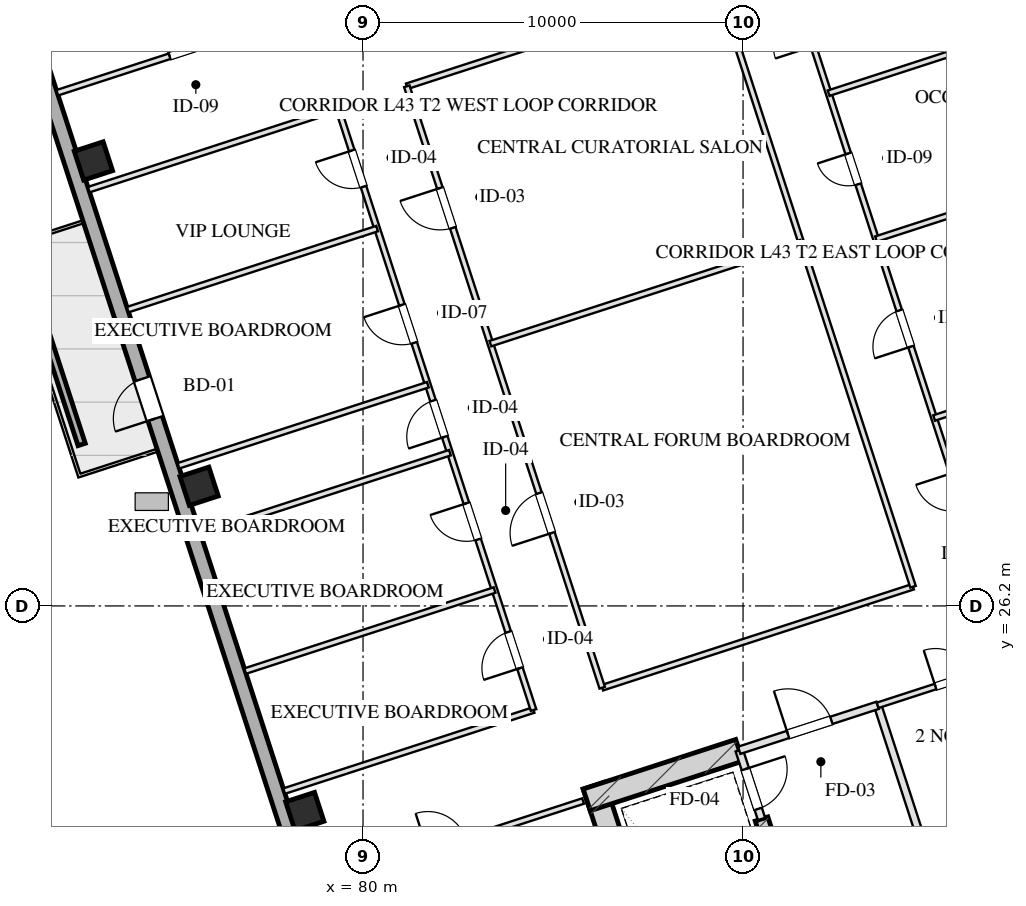
"""IFC4 building model, lengths in metres.
Left out: names, types, materials, properties, quantities, classifications, styles, units other than length and angle.
Written with IfcOpenShell. Run it as: python <this file> out.ifc"""

import sys

from ifc_helpers import new_model, si_unit, direction, frame, frame_2d, origin, origin_2d, place, context, subcontext, project, spatial, rectangle, hollow_rectangle, extrude, element, fill, save


model = new_model("IFC4")
c1 = context("Model", 3, precision=1e-05, world=origin(), true_north=direction((0.0, 1.0)))
c2 = subcontext(c1, "Body", "Model", "MODEL_VIEW")
j1 = project(units=[si_unit("LENGTHUNIT", "METRE"), si_unit("PLANEANGLEUNIT", "RADIAN")], contexts=[c1])
p1 = place(None, origin())
s1 = spatial("IfcSite", under=j1, at=p1, CompositionType="ELEMENT")
p2 = place(p1, origin())
s2 = spatial("IfcBuilding", under=s1, at=p2, CompositionType="ELEMENT")
p3 = place(p2, frame((0.0, 0.0, 163.3)))
s3 = spatial("IfcBuildingStorey", under=s2, at=p3, CompositionType="ELEMENT", Elevation=163.3)
p4 = place(p3, frame((86.078, 21.475, 0.0), z_axis=(0.0, 0.0, 1.0), x_axis=(0.309017938678, -0.951056209472, 0.0)))
e1 = element("IfcWall", 1, at=p4, inside=s3, PredefinedType="SHEAR", context=c2, shape_type="SweptSolid", body=[
    extrude(rectangle(XDim=9.48, YDim=0.6, at=frame_2d((4.74, 0.0))), origin(), (0.0, 0.0, 1.0), 3.45),
])
p5 = place(p3, frame((90.486, 20.594, 0.0), z_axis=(0.0, 0.0, 1.0), x_axis=(0.309020428229, -0.951055400562, 0.0)))
e2 = element("IfcWall", 2, at=p5, inside=s3, PredefinedType="SHEAR", context=c2, shape_type="SweptSolid", body=[
    extrude(rectangle(XDim=6.98, YDim=0.35, at=frame_2d((3.49, 0.0))), origin(), (0.0, 0.0, 1.0), 3.45),
])
p6 = place(p3, frame((85.886, 21.097, 0.0), z_axis=(0.0, 0.0, 1.0), x_axis=(0.951068073652, 0.308981422225, 0.0)))
e3 = element("IfcWall", 3, at=p6, inside=s3, PredefinedType="SHEAR", context=c2, shape_type="SweptSolid", body=[
    extrude(rectangle(XDim=4.22, YDim=0.6, at=frame_2d((2.11, 0.0))), origin(), (0.0, 0.0, 1.0), 3.45),
])
for number, where, z_axis, x_axis in (
    (4, (78.468, 20.79, 0.0), (0.0, 0.0, 1.0), (0.951, 0.309, 0.0)),
    (5, (75.687, 29.349, 0.0), (0.0, 0.0, 1.0), (0.951, 0.309, 0.0)),
    (6, (72.906, 37.909, 0.0), (0.0, 0.0, 1.0), (0.951, 0.309, 0.0)),
):
    element("IfcColumn", number, at=place(p3, frame(where, z_axis=z_axis, x_axis=x_axis)), inside=s3, PredefinedType="COLUMN", context=c2, shape_type="SweptSolid", body=[
        extrude(hollow_rectangle(XDim=0.8, YDim=0.8, WallThickness=0.028, at=origin_2d()), origin(), (0.0, 0.0, 1.0), 3.451),
    ])
p7 = place(p3, frame((81.776, 8.827, 0.0), z_axis=(0.0, 0.0, 1.0), x_axis=(-0.309014228706, 0.951057414911, 0.0)))
e7 = element("IfcWall", 7, at=p7, inside=s3, PredefinedType="SOLIDWALL", context=c2, shape_type="SweptSolid", body=[
    extrude(rectangle(XDim=42.8, YDim=0.4, at=frame_2d((21.4, 0.0))), origin(), (0.0, 0.0, 1.0), 2.61),
])
p8 = place(p7, frame((23.45, 0.0, 0.0)))
e8 = element("IfcOpeningElement", 8, at=p8, cuts=e7, PredefinedType="OPENING", context=c2, shape_type="SweptSolid", body=[
    extrude(rectangle(XDim=1.1, YDim=2.15, at=frame_2d((0.55, 1.075))), frame((0.0, 0.21, 0.0), z_axis=(0.0, -1.0, 0.0), x_axis=(1.0, 0.0, 0.0)), (0.0, 0.0, 1.0), 0.42),
])
p9 = place(p3, frame((72.596, 30.448, 0.0), z_axis=(0.0, 0.0, 1.0), x_axis=(-0.30900096172, 0.951061725471, 0.0)))
e9 = element("IfcWall", 9, at=p9, inside=s3, PredefinedType="PARAPET", context=c2, shape_type="SweptSolid", body=[
    extrude(rectangle(XDim=4.8, YDim=0.2, at=frame_2d((2.4, 0.0))), origin(), (0.0, 0.0, 1.0), 0.75),
])
p10 = place(p3, frame((89.899, 22.401, 0.0), z_axis=(0.0, 0.0, 1.0), x_axis=(0.308932062672, -0.951084108086, 0.0)))
e10 = element("IfcWall", 10, at=p10, inside=s3, PredefinedType="PARTITIONING", context=c2, shape_type="SweptSolid", body=[
    extrude(rectangle(XDim=1.9, YDim=0.2, at=frame_2d((0.95, 0.0))), origin(), (0.0, 0.0, 1.0), 3.175),
])
p11 = place(p10, frame((0.52, 0.0, 0.0)))
e11 = element("IfcOpeningElement", 11, at=p11, cuts=e10, PredefinedType="OPENING", context=c2, shape_type="SweptSolid", body=[
    extrude(rectangle(XDim=1.1, YDim=2.05, at=frame_2d((0.55, 1.025))), frame((0.0, 0.11, 0.0), z_axis=(0.0, -1.0, 0.0), x_axis=(1.0, 0.0, 0.0)), (0.0, 0.0, 1.0), 0.22),
])
p12 = place(p3, frame((93.542, 23.585, 0.0), z_axis=(0.0, 0.0, 1.0), x_axis=(0.309042196757, -0.951048327176, 0.0)))
e12 = element("IfcWall", 12, at=p12, inside=s3, PredefinedType="PARTITIONING", context=c2, shape_type="SweptSolid", body=[
    extrude(rectangle(XDim=8.43, YDim=0.2, at=frame_2d((4.215, 0.0))), origin(), (0.0, 0.0, 1.0), 3.175),
])
p13 = place(p3, frame((89.899, 22.401, 0.0), z_axis=(0.0, 0.0, 1.0), x_axis=(0.951046716504, 0.309047153403, 0.0)))
e13 = element("IfcWall", 13, at=p13, inside=s3, PredefinedType="PARTITIONING", context=c2, shape_type="SweptSolid", body=[
    extrude(rectangle(XDim=3.83, YDim=0.2, at=frame_2d((1.915, 0.0))), origin(), (0.0, 0.0, 1.0), 3.175),
])
p14 = place(p13, frame((1.35, 0.0, 0.0)))
e14 = element("IfcOpeningElement", 14, at=p14, cuts=e13, PredefinedType="OPENING", context=c2, shape_type="SweptSolid", body=[
    extrude(rectangle(XDim=1.2, YDim=2.05, at=frame_2d((0.6, 1.025))), frame((0.0, 0.11, 0.0), z_axis=(0.0, -1.0, 0.0), x_axis=(1.0, 0.0, 0.0)), (0.0, 0.0, 1.0), 0.22),
])
p15 = place(p3, frame((93.542, 23.585, 0.0), z_axis=(0.0, 0.0, 1.0), x_axis=(0.951063829732, 0.308994485023, 0.0)))
e15 = element("IfcWall", 15, at=p15, inside=s3, PredefinedType="PARTITIONING", context=c2, shape_type="SweptSolid", body=[
    extrude(rectangle(XDim=4.4, YDim=0.15, at=frame_2d((2.2, 0.0))), origin(), (0.0, 0.0, 1.0), 3.175),
])
p16 = place(p15, frame((1.6, 0.0, 0.0)))
e16 = element("IfcOpeningElement", 16, at=p16, cuts=e15, PredefinedType="OPENING", context=c2, shape_type="SweptSolid", body=[
    extrude(rectangle(XDim=1.0, YDim=2.05, at=frame_2d((0.5, 1.025))), frame((0.0, 0.085, 0.0), z_axis=(0.0, -1.0, 0.0), x_axis=(1.0, 0.0, 0.0)), (0.0, 0.0, 1.0), 0.17),
])
p17 = place(p3, frame((78.753, 18.78, 0.0), z_axis=(0.0, 0.0, 1.0), x_axis=(0.951060977215, 0.309003264738, 0.0)))
e17 = element("IfcWall", 17, at=p17, inside=s3, PredefinedType="PARTITIONING", context=c2, shape_type="SweptSolid", body=[
    extrude(rectangle(XDim=7.4, YDim=0.15, at=frame_2d((3.7, 0.0))), origin(), (0.0, 0.0, 1.0), 3.175),
])
p18 = place(p17, frame((3.108, 0.0, 0.0)))
e18 = element("IfcOpeningElement", 18, at=p18, cuts=e17, PredefinedType="OPENING", context=c2, shape_type="SweptSolid", body=[
    extrude(rectangle(XDim=1.05, YDim=2.05, at=frame_2d((0.525, 1.025))), frame((0.0, 0.085, 0.0), z_axis=(0.0, -1.0, 0.0), x_axis=(1.0, 0.0, 0.0)), (0.0, 0.0, 1.0), 0.17),
])
p19 = place(p3, frame((71.955, 39.703, 0.0), z_axis=(0.0, 0.0, 1.0), x_axis=(0.951060977215, 0.309003264738, 0.0)))
e19 = element("IfcWall", 19, at=p19, inside=s3, PredefinedType="PARTITIONING", context=c2, shape_type="SweptSolid", body=[
    extrude(rectangle(XDim=7.4, YDim=0.15, at=frame_2d((3.7, 0.0))), origin(), (0.0, 0.0, 1.0), 3.175),
])
p20 = place(p19, frame((3.108, 0.0, 0.0)))
e20 = element("IfcOpeningElement", 20, at=p20, cuts=e19, PredefinedType="OPENING", context=c2, shape_type="SweptSolid", body=[
    extrude(rectangle(XDim=0.85, YDim=2.05, at=frame_2d((0.425, 1.025))), frame((0.0, 0.085, 0.0), z_axis=(0.0, -1.0, 0.0), x_axis=(1.0, 0.0, 0.0)), (0.0, 0.0, 1.0), 0.17),
])
p21 = place(p3, frame((77.925, 21.328, 0.0), z_axis=(0.0, 0.0, 1.0), x_axis=(0.951061887302, 0.309000463626, 0.0)))
e21 = element("IfcWall", 21, at=p21, inside=s3, PredefinedType="PARTITIONING", context=c2, shape_type="SweptSolid", body=[
    extrude(rectangle(XDim=6.9, YDim=0.15, at=frame_2d((3.45, 0.0))), origin(), (0.0, 0.0, 1.0), 3.175),
])
p22 = place(p3, frame((86.294, 24.048, 0.0), z_axis=(0.0, 0.0, 1.0), x_axis=(0.951052008164, 0.309030868631, 0.0)))
e22 = element("IfcWall", 22, at=p22, inside=s3, PredefinedType="PARTITIONING", context=c2, shape_type="SweptSolid", body=[
    extrude(rectangle(XDim=8.6, YDim=0.15, at=frame_2d((4.3, 0.0))), origin(), (0.0, 0.0, 1.0), 3.175),
])
p23 = place(p3, frame((72.783, 37.154, 0.0), z_axis=(0.0, 0.0, 1.0), x_axis=(0.951051488548, 0.309032467762, 0.0)))
e23 = element("IfcWall", 23, at=p23, inside=s3, PredefinedType="PARTITIONING", context=c2, shape_type="SweptSolid", body=[
    extrude(rectangle(XDim=6.9, YDim=0.15, at=frame_2d((3.45, 0.0))), origin(), (0.0, 0.0, 1.0), 3.175),
])
p24 = place(p3, frame((81.152, 39.873, 0.0), z_axis=(0.0, 0.0, 1.0), x_axis=(0.951057640494, 0.309013534425, 0.0)))
e24 = element("IfcWall", 24, at=p24, inside=s3, PredefinedType="PARTITIONING", context=c2, shape_type="SweptSolid", body=[
    extrude(rectangle(XDim=8.6, YDim=0.15, at=frame_2d((4.3, 0.0))), origin(), (0.0, 0.0, 1.0), 3.175),
])
p25 = place(p3, frame((84.487, 23.46, 0.0), z_axis=(0.0, 0.0, 1.0), x_axis=(-0.30901773025, 0.951056277195, 0.0)))
e25 = element("IfcWall", 25, at=p25, inside=s3, PredefinedType="PARTITIONING", context=c2, shape_type="SweptSolid", body=[
    extrude(rectangle(XDim=16.64, YDim=0.15, at=frame_2d((8.32, 0.0))), origin(), (0.0, 0.0, 1.0), 3.175),
])
p26 = place(p25, frame((1.16, 0.0, 0.0)))
e26 = element("IfcOpeningElement", 26, at=p26, cuts=e25, PredefinedType="OPENING", context=c2, shape_type="SweptSolid", body=[
    extrude(rectangle(XDim=1.0, YDim=2.05, at=frame_2d((0.5, 1.025))), frame((0.0, 0.085, 0.0), z_axis=(0.0, -1.0, 0.0), x_axis=(1.0, 0.0, 0.0)), (0.0, 0.0, 1.0), 0.17),
])
p27 = place(p25, frame((4.72, 0.0, 0.0)))
e27 = element("IfcOpeningElement", 27, at=p27, cuts=e25, PredefinedType="OPENING", context=c2, shape_type="SweptSolid", body=[
    extrude(rectangle(XDim=1.0, YDim=2.05, at=frame_2d((0.5, 1.025))), frame((0.0, 0.085, 0.0), z_axis=(0.0, -1.0, 0.0), x_axis=(1.0, 0.0, 0.0)), (0.0, 0.0, 1.0), 0.17),
])
p28 = place(p25, frame((7.56, 0.0, 0.0)))
e28 = element("IfcOpeningElement", 28, at=p28, cuts=e25, PredefinedType="OPENING", context=c2, shape_type="SweptSolid", body=[
    extrude(rectangle(XDim=1.0, YDim=2.05, at=frame_2d((0.5, 1.025))), frame((0.0, 0.085, 0.0), z_axis=(0.0, -1.0, 0.0), x_axis=(1.0, 0.0, 0.0)), (0.0, 0.0, 1.0), 0.17),
])
p29 = place(p25, frame((10.16, 0.0, 0.0)))
e29 = element("IfcOpeningElement", 29, at=p29, cuts=e25, PredefinedType="OPENING", context=c2, shape_type="SweptSolid", body=[
    extrude(rectangle(XDim=1.05, YDim=2.05, at=frame_2d((0.525, 1.025))), frame((0.0, 0.085, 0.0), z_axis=(0.0, -1.0, 0.0), x_axis=(1.0, 0.0, 0.0)), (0.0, 0.0, 1.0), 0.17),
])
p30 = place(p25, frame((14.48, 0.0, 0.0)))
e30 = element("IfcOpeningElement", 30, at=p30, cuts=e25, PredefinedType="OPENING", context=c2, shape_type="SweptSolid", body=[
    extrude(rectangle(XDim=1.0, YDim=2.05, at=frame_2d((0.5, 1.025))), frame((0.0, 0.085, 0.0), z_axis=(0.0, -1.0, 0.0), x_axis=(1.0, 0.0, 0.0)), (0.0, 0.0, 1.0), 0.17),
])
p31 = place(p3, frame((86.294, 24.048, 0.0), z_axis=(0.0, 0.0, 1.0), x_axis=(-0.309004459387, 0.951060589068, 0.0)))
e31 = element("IfcWall", 31, at=p31, inside=s3, PredefinedType="PARTITIONING", context=c2, shape_type="SweptSolid", body=[
    extrude(rectangle(XDim=16.64, YDim=0.15, at=frame_2d((8.32, 0.0))), origin(), (0.0, 0.0, 1.0), 3.175),
])
p32 = place(p31, frame((4.284, 0.0, 0.0)))
e32 = element("IfcOpeningElement", 32, at=p32, cuts=e31, PredefinedType="OPENING", context=c2, shape_type="SweptSolid", body=[
    extrude(rectangle(XDim=1.1, YDim=2.05, at=frame_2d((0.55, 1.025))), frame((0.0, 0.085, 0.0), z_axis=(0.0, -1.0, 0.0), x_axis=(1.0, 0.0, 0.0)), (0.0, 0.0, 1.0), 0.17),
])
p33 = place(p31, frame((12.724, 0.0, 0.0)))
e33 = element("IfcOpeningElement", 33, at=p33, cuts=e31, PredefinedType="OPENING", context=c2, shape_type="SweptSolid", body=[
    extrude(rectangle(XDim=1.1, YDim=2.05, at=frame_2d((0.55, 1.025))), frame((0.0, 0.085, 0.0), z_axis=(0.0, -1.0, 0.0), x_axis=(1.0, 0.0, 0.0)), (0.0, 0.0, 1.0), 0.17),
])
p34 = place(p3, frame((94.473, 26.705, 0.0), z_axis=(0.0, 0.0, 1.0), x_axis=(-0.309022042254, 0.951054876125, 0.0)))
e34 = element("IfcWall", 34, at=p34, inside=s3, PredefinedType="PARTITIONING", context=c2, shape_type="SweptSolid", body=[
    extrude(rectangle(XDim=16.64, YDim=0.15, at=frame_2d((8.32, 0.0))), origin(), (0.0, 0.0, 1.0), 3.175),
])
p35 = place(p3, frame((96.28, 27.292, 0.0), z_axis=(0.0, 0.0, 1.0), x_axis=(-0.309008771245, 0.951059188113, 0.0)))
e35 = element("IfcWall", 35, at=p35, inside=s3, PredefinedType="PARTITIONING", context=c2, shape_type="SweptSolid", body=[
    extrude(rectangle(XDim=16.64, YDim=0.15, at=frame_2d((8.32, 0.0))), origin(), (0.0, 0.0, 1.0), 3.175),
])
p36 = place(p35, frame((1.526, 0.0, 0.0)))
e36 = element("IfcOpeningElement", 36, at=p36, cuts=e35, PredefinedType="OPENING", context=c2, shape_type="SweptSolid", body=[
    extrude(rectangle(XDim=1.0, YDim=2.05, at=frame_2d((0.5, 1.025))), frame((0.0, 0.085, 0.0), z_axis=(0.0, -1.0, 0.0), x_axis=(1.0, 0.0, 0.0)), (0.0, 0.0, 1.0), 0.17),
])
p37 = place(p35, frame((6.026, 0.0, 0.0)))
e37 = element("IfcOpeningElement", 37, at=p37, cuts=e35, PredefinedType="OPENING", context=c2, shape_type="SweptSolid", body=[
    extrude(rectangle(XDim=1.0, YDim=2.05, at=frame_2d((0.5, 1.025))), frame((0.0, 0.085, 0.0), z_axis=(0.0, -1.0, 0.0), x_axis=(1.0, 0.0, 0.0)), (0.0, 0.0, 1.0), 0.17),
])
p38 = place(p35, frame((10.519, 0.0, 0.0)))
e38 = element("IfcOpeningElement", 38, at=p38, cuts=e35, PredefinedType="OPENING", context=c2, shape_type="SweptSolid", body=[
    extrude(rectangle(XDim=0.85, YDim=2.05, at=frame_2d((0.425, 1.025))), frame((0.0, 0.085, 0.0), z_axis=(0.0, -1.0, 0.0), x_axis=(1.0, 0.0, 0.0)), (0.0, 0.0, 1.0), 0.17),
])
p39 = place(p35, frame((14.338, 0.0, 0.0)))
e39 = element("IfcOpeningElement", 39, at=p39, cuts=e35, PredefinedType="OPENING", context=c2, shape_type="SweptSolid", body=[
    extrude(rectangle(XDim=1.05, YDim=2.05, at=frame_2d((0.525, 1.025))), frame((0.0, 0.085, 0.0), z_axis=(0.0, -1.0, 0.0), x_axis=(1.0, 0.0, 0.0)), (0.0, 0.0, 1.0), 0.17),
])
p40 = place(p3, frame((83.352, 33.102, 0.0), z_axis=(0.0, 0.0, 1.0), x_axis=(0.951057640494, 0.309013534425, 0.0)))
e40 = element("IfcWall", 40, at=p40, inside=s3, PredefinedType="PARTITIONING", context=c2, shape_type="SweptSolid", body=[
    extrude(rectangle(XDim=8.6, YDim=0.15, at=frame_2d((4.3, 0.0))), origin(), (0.0, 0.0, 1.0), 3.175),
])
for number, where, z_axis, x_axis in (
    (41, (76.899, 24.486, 0.0), (0.0, 0.0, 1.0), (0.951, 0.309, 0.0)),
    (42, (75.725, 28.1, 0.0), (0.0, 0.0, 1.0), (0.951, 0.309, 0.0)),
    (43, (75.144, 29.888, 0.0), (0.0, 0.0, 1.0), (0.951, 0.309, 0.0)),
    (44, (73.809, 33.996, 0.0), (0.0, 0.0, 1.0), (0.951, 0.309, 0.0)),
):
    element("IfcWall", number, at=place(p3, frame(where, z_axis=z_axis, x_axis=x_axis)), inside=s3, PredefinedType="PARTITIONING", context=c2, shape_type="SweptSolid", body=[
        extrude(rectangle(XDim=6.9, YDim=0.15, at=frame_2d((3.45, 0.0))), origin(), (0.0, 0.0, 1.0), 3.175),
    ])
p41 = place(p3, frame((95.028, 31.146, 0.0), z_axis=(0.0, 0.0, 1.0), x_axis=(0.951056999652, 0.309015506751, 0.0)))
e45 = element("IfcWall", 45, at=p41, inside=s3, PredefinedType="PARTITIONING", context=c2, shape_type="SweptSolid", body=[
    extrude(rectangle(XDim=11.5, YDim=0.15, at=frame_2d((5.75, 0.0))), origin(), (0.0, 0.0, 1.0), 3.175),
])
p42 = place(p3, frame((93.499, 35.852, 0.0), z_axis=(0.0, 0.0, 1.0), x_axis=(0.951054972381, 0.309021746015, 0.0)))
e46 = element("IfcWall", 46, at=p42, inside=s3, PredefinedType="PARTITIONING", context=c2, shape_type="SweptSolid", body=[
    extrude(rectangle(XDim=11.5, YDim=0.15, at=frame_2d((5.75, 0.0))), origin(), (0.0, 0.0, 1.0), 3.175),
])
p43 = place(p3, frame((92.251, 39.691, 0.0), z_axis=(0.0, 0.0, 1.0), x_axis=(0.951063238644, 0.308996304347, 0.0)))
e47 = element("IfcWall", 47, at=p43, inside=s3, PredefinedType="PARTITIONING", context=c2, shape_type="SweptSolid", body=[
    extrude(rectangle(XDim=11.5, YDim=0.15, at=frame_2d((5.75, 0.0))), origin(), (0.0, 0.0, 1.0), 3.175),
])
p44 = place(p8, origin())
e48 = element("IfcDoor", 48, at=p44, inside=s3, OperationType="SINGLE_SWING_LEFT", PredefinedType="DOOR", context=c2, shape_type="SweptSolid", body=[
    extrude(rectangle(XDim=1.1, YDim=2.15, at=frame_2d((0.55, 1.075))), frame((0.0, 0.025, 0.0), z_axis=(0.0, -1.0, 0.0), x_axis=(1.0, 0.0, 0.0)), (0.0, 0.0, 1.0), 0.05),
])
fill(e8, e48)
p45 = place(p11, origin())
e49 = element("IfcDoor", 49, at=p45, inside=s3, OperationType="SINGLE_SWING_LEFT", PredefinedType="DOOR", context=c2, shape_type="SweptSolid", body=[
    extrude(rectangle(XDim=1.1, YDim=2.05, at=frame_2d((0.55, 1.025))), frame((0.0, 0.025, 0.0), z_axis=(0.0, -1.0, 0.0), x_axis=(1.0, 0.0, 0.0)), (0.0, 0.0, 1.0), 0.05),
])
fill(e11, e49)
p46 = place(p14, origin())
e50 = element("IfcDoor", 50, at=p46, inside=s3, OperationType="SINGLE_SWING_LEFT", PredefinedType="DOOR", context=c2, shape_type="SweptSolid", body=[
    extrude(rectangle(XDim=1.2, YDim=2.05, at=frame_2d((0.6, 1.025))), frame((0.0, 0.025, 0.0), z_axis=(0.0, -1.0, 0.0), x_axis=(1.0, 0.0, 0.0)), (0.0, 0.0, 1.0), 0.05),
])
fill(e14, e50)
p47 = place(p16, origin())
e51 = element("IfcDoor", 51, at=p47, inside=s3, OperationType="SINGLE_SWING_LEFT", PredefinedType="DOOR", context=c2, shape_type="SweptSolid", body=[
    extrude(rectangle(XDim=1.0, YDim=2.05, at=frame_2d((0.5, 1.025))), frame((0.0, 0.025, 0.0), z_axis=(0.0, -1.0, 0.0), x_axis=(1.0, 0.0, 0.0)), (0.0, 0.0, 1.0), 0.05),
])
fill(e16, e51)
p48 = place(p20, origin())
e52 = element("IfcDoor", 52, at=p48, inside=s3, OperationType="SINGLE_SWING_LEFT", PredefinedType="DOOR", context=c2, shape_type="SweptSolid", body=[
    extrude(rectangle(XDim=0.85, YDim=2.05, at=frame_2d((0.425, 1.025))), frame((0.0, 0.025, 0.0), z_axis=(0.0, -1.0, 0.0), x_axis=(1.0, 0.0, 0.0)), (0.0, 0.0, 1.0), 0.05),
])
fill(e20, e52)
p49 = place(p26, origin())
e53 = element("IfcDoor", 53, at=p49, inside=s3, OperationType="SINGLE_SWING_LEFT", PredefinedType="DOOR", context=c2, shape_type="SweptSolid", body=[
    extrude(rectangle(XDim=1.0, YDim=2.05, at=frame_2d((0.5, 1.025))), frame((0.0, 0.025, 0.0), z_axis=(0.0, -1.0, 0.0), x_axis=(1.0, 0.0, 0.0)), (0.0, 0.0, 1.0), 0.05),
])
fill(e26, e53)
p50 = place(p27, origin())
e54 = element("IfcDoor", 54, at=p50, inside=s3, OperationType="SINGLE_SWING_RIGHT", PredefinedType="DOOR", context=c2, shape_type="SweptSolid", body=[
    extrude(rectangle(XDim=1.0, YDim=2.05, at=frame_2d((0.5, 1.025))), frame((0.0, 0.025, 0.0), z_axis=(0.0, -1.0, 0.0), x_axis=(1.0, 0.0, 0.0)), (0.0, 0.0, 1.0), 0.05),
])
fill(e27, e54)
p51 = place(p28, origin())
e55 = element("IfcDoor", 55, at=p51, inside=s3, OperationType="SINGLE_SWING_LEFT", PredefinedType="DOOR", context=c2, shape_type="SweptSolid", body=[
    extrude(rectangle(XDim=1.0, YDim=2.05, at=frame_2d((0.5, 1.025))), frame((0.0, 0.025, 0.0), z_axis=(0.0, -1.0, 0.0), x_axis=(1.0, 0.0, 0.0)), (0.0, 0.0, 1.0), 0.05),
])
fill(e28, e55)
p52 = place(p29, origin())
e56 = element("IfcDoor", 56, at=p52, inside=s3, OperationType="SINGLE_SWING_RIGHT", PredefinedType="DOOR", context=c2, shape_type="SweptSolid", body=[
    extrude(rectangle(XDim=1.05, YDim=2.05, at=frame_2d((0.525, 1.025))), frame((0.0, 0.025, 0.0), z_axis=(0.0, -1.0, 0.0), x_axis=(1.0, 0.0, 0.0)), (0.0, 0.0, 1.0), 0.05),
])
fill(e29, e56)
p53 = place(p30, origin())
e57 = element("IfcDoor", 57, at=p53, inside=s3, OperationType="SINGLE_SWING_RIGHT", PredefinedType="DOOR", context=c2, shape_type="SweptSolid", body=[
    extrude(rectangle(XDim=1.0, YDim=2.05, at=frame_2d((0.5, 1.025))), frame((0.0, 0.025, 0.0), z_axis=(0.0, -1.0, 0.0), x_axis=(1.0, 0.0, 0.0)), (0.0, 0.0, 1.0), 0.05),
])
fill(e30, e57)
p54 = place(p32, origin())
e58 = element("IfcDoor", 58, at=p54, inside=s3, OperationType="SINGLE_SWING_LEFT", PredefinedType="DOOR", context=c2, shape_type="SweptSolid", body=[
    extrude(rectangle(XDim=1.1, YDim=2.05, at=frame_2d((0.55, 1.025))), frame((0.0, 0.025, 0.0), z_axis=(0.0, -1.0, 0.0), x_axis=(1.0, 0.0, 0.0)), (0.0, 0.0, 1.0), 0.05),
])
fill(e32, e58)
p55 = place(p33, origin())
e59 = element("IfcDoor", 59, at=p55, inside=s3, OperationType="SINGLE_SWING_RIGHT", PredefinedType="DOOR", context=c2, shape_type="SweptSolid", body=[
    extrude(rectangle(XDim=1.1, YDim=2.05, at=frame_2d((0.55, 1.025))), frame((0.0, 0.025, 0.0), z_axis=(0.0, -1.0, 0.0), x_axis=(1.0, 0.0, 0.0)), (0.0, 0.0, 1.0), 0.05),
])
fill(e33, e59)
p56 = place(p37, origin())
e60 = element("IfcDoor", 60, at=p56, inside=s3, OperationType="SINGLE_SWING_LEFT", PredefinedType="DOOR", context=c2, shape_type="SweptSolid", body=[
    extrude(rectangle(XDim=1.0, YDim=2.05, at=frame_2d((0.5, 1.025))), frame((0.0, 0.025, 0.0), z_axis=(0.0, -1.0, 0.0), x_axis=(1.0, 0.0, 0.0)), (0.0, 0.0, 1.0), 0.05),
])
fill(e37, e60)
p57 = place(p38, origin())
e61 = element("IfcDoor", 61, at=p57, inside=s3, OperationType="SINGLE_SWING_RIGHT", PredefinedType="DOOR", context=c2, shape_type="SweptSolid", body=[
    extrude(rectangle(XDim=0.85, YDim=2.05, at=frame_2d((0.425, 1.025))), frame((0.0, 0.025, 0.0), z_axis=(0.0, -1.0, 0.0), x_axis=(1.0, 0.0, 0.0)), (0.0, 0.0, 1.0), 0.05),
])
fill(e38, e61)
save(model, sys.argv[1])
